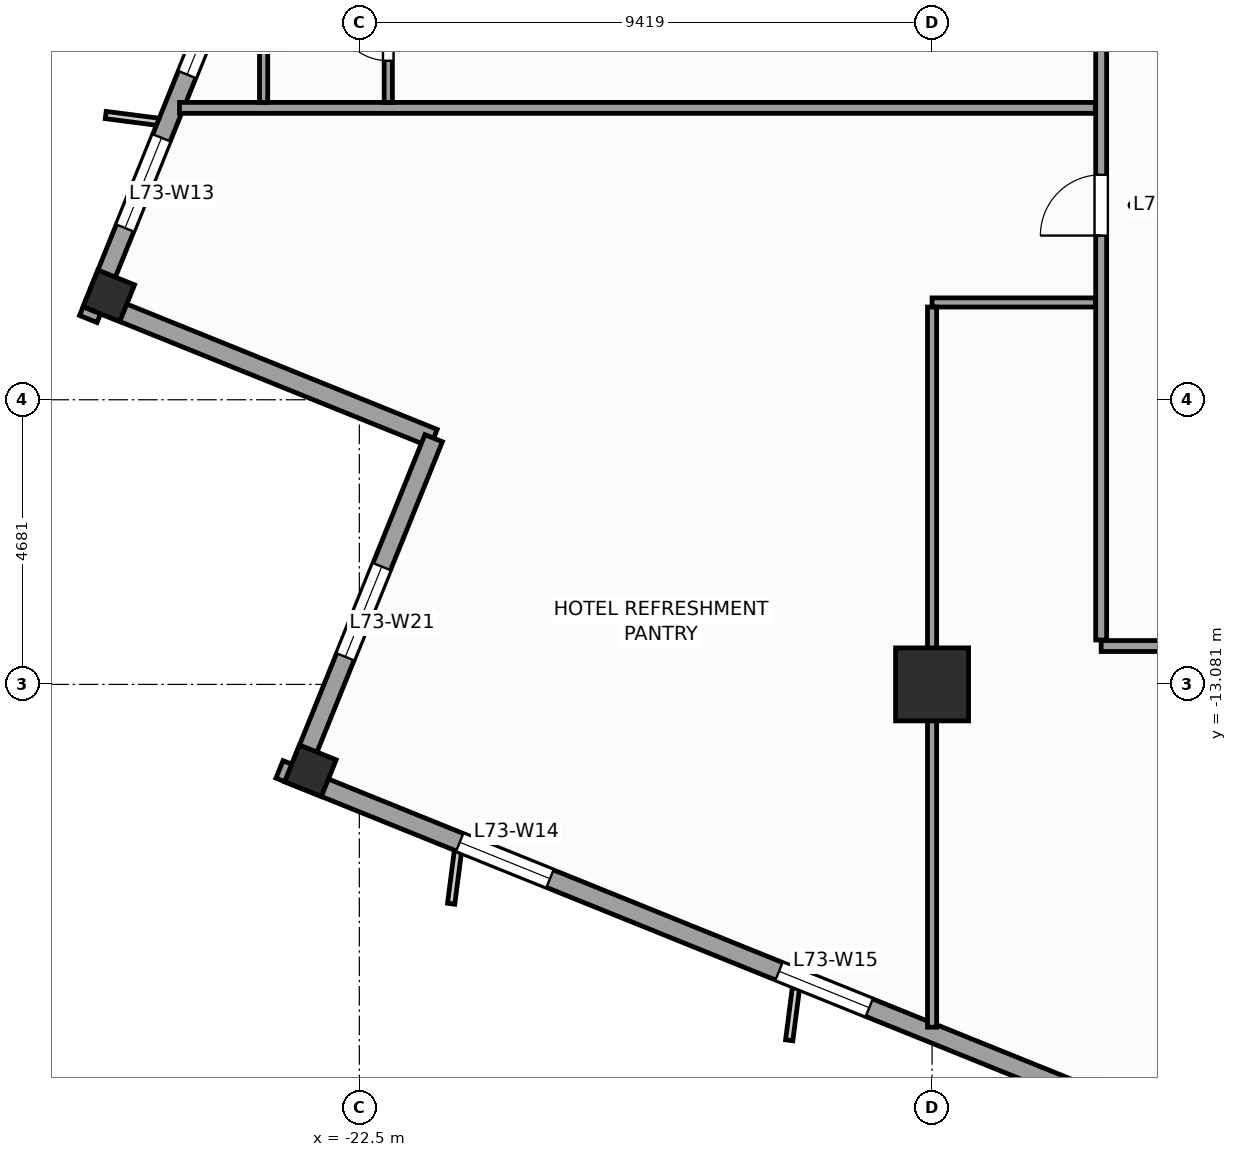
"""IFC4 building model, lengths in metres.
Left out: names, types, materials, properties, quantities, classifications, styles, units other than length and angle.
Written with IfcOpenShell. Run it as: python <this file> out.ifc"""

import sys

from ifc_helpers import new_model, si_unit, direction, frame, frame_2d, origin, origin_2d, place, context, subcontext, project, spatial, rectangle, extrude, source, transform, mapped, element, fill, save


model = new_model("IFC4")
c1 = context("Model", 3, precision=1e-05, world=origin(), true_north=direction((0.0, 1.0)))
c2 = subcontext(c1, "Body", "Model", "MODEL_VIEW")
j1 = project(units=[si_unit("LENGTHUNIT", "METRE"), si_unit("PLANEANGLEUNIT", "RADIAN")], contexts=[c1])
p1 = place(None, origin())
s1 = spatial("IfcSite", under=j1, at=p1, CompositionType="ELEMENT")
p2 = place(p1, origin())
s2 = spatial("IfcBuilding", under=s1, at=p2, CompositionType="ELEMENT")
p3 = place(p2, frame((0.0, 0.0, 297.6)))
s3 = spatial("IfcBuildingStorey", under=s2, at=p3, CompositionType="ELEMENT", Elevation=297.6)
m1 = source(origin(), c2, "Body", "SweptSolid", [
    extrude(rectangle(XDim=1.2, YDim=1.2, at=origin_2d()), origin(), (0.0, 0.0, 1.0), 3.6),
])
p4 = place(p3, frame((-13.081, -13.081, 0.0), z_axis=(0.0, 0.0, 1.0), x_axis=(1.0, 0.0, 0.0)))
e1 = element("IfcColumn", 1, at=p4, inside=s3, PredefinedType="COLUMN", context=c2, shape_type="MappedRepresentation", body=[
    mapped(m1, transform((0.0, 0.0, 0.0), scale=1.0)),
])
m2 = source(origin(), c2, "Body", "SweptSolid", [
    extrude(rectangle(XDim=0.65, YDim=0.65, at=origin_2d()), origin(), (0.0, 0.0, 1.0), 3.6),
])
for number, where, z_axis, x_axis in (
    (2, (-26.62, -6.69, 0.0), (0.0, 0.0, 1.0), (0.375, 0.927, 0.0)),
    (3, (-23.304, -14.501, 0.0), (0.0, 0.0, 1.0), (0.375, 0.927, 0.0)),
):
    element("IfcColumn", number, at=place(p3, frame(where, z_axis=z_axis, x_axis=x_axis)), inside=s3, PredefinedType="COLUMN", context=c2, shape_type="MappedRepresentation", body=[
        mapped(m2, transform((0.0, 0.0, 0.0), scale=1.0)),
    ])
p5 = place(p3, frame((-14.479, 23.813, 0.0), z_axis=(0.0, 0.0, 1.0), x_axis=(-0.374609557019, -0.927182657188, 0.0)))
e4 = element("IfcWall", 4, at=p5, inside=s3, PredefinedType="STANDARD", context=c2, shape_type="SweptSolid", body=[
    extrude(rectangle(XDim=33.31, YDim=0.31, at=frame_2d((16.655, 0.0))), origin(), (0.0, 0.0, 1.0), 2.75),
])
p6 = place(p5, frame((3.197, 0.0, 0.47)))
e5 = element("IfcOpeningElement", 5, at=p6, cuts=e4, PredefinedType="OPENING", context=c2, shape_type="SweptSolid", body=[
    extrude(rectangle(XDim=1.6, YDim=2.1, at=frame_2d((0.8, 1.05))), frame((0.0, 0.165, 0.0), z_axis=(0.0, -1.0, 0.0), x_axis=(1.0, 0.0, 0.0)), (0.0, 0.0, 1.0), 0.33),
])
p7 = place(p5, frame((8.86, 0.0, 0.47)))
e6 = element("IfcOpeningElement", 6, at=p7, cuts=e4, PredefinedType="OPENING", context=c2, shape_type="SweptSolid", body=[
    extrude(rectangle(XDim=1.6, YDim=2.1, at=frame_2d((0.8, 1.05))), frame((0.0, 0.165, 0.0), z_axis=(0.0, -1.0, 0.0), x_axis=(1.0, 0.0, 0.0)), (0.0, 0.0, 1.0), 0.33),
])
p8 = place(p5, frame((14.439, 0.0, 0.47)))
e7 = element("IfcOpeningElement", 7, at=p8, cuts=e4, PredefinedType="OPENING", context=c2, shape_type="SweptSolid", body=[
    extrude(rectangle(XDim=1.6, YDim=2.1, at=frame_2d((0.8, 1.05))), frame((0.0, 0.165, 0.0), z_axis=(0.0, -1.0, 0.0), x_axis=(1.0, 0.0, 0.0)), (0.0, 0.0, 1.0), 0.33),
])
p9 = place(p5, frame((23.351, 0.0, 0.47)))
e8 = element("IfcOpeningElement", 8, at=p9, cuts=e4, PredefinedType="OPENING", context=c2, shape_type="SweptSolid", body=[
    extrude(rectangle(XDim=1.6, YDim=2.1, at=frame_2d((0.8, 1.05))), frame((0.0, 0.165, 0.0), z_axis=(0.0, -1.0, 0.0), x_axis=(1.0, 0.0, 0.0)), (0.0, 0.0, 1.0), 0.33),
])
p10 = place(p5, frame((30.097, 0.0, 0.47)))
e9 = element("IfcOpeningElement", 9, at=p10, cuts=e4, PredefinedType="OPENING", context=c2, shape_type="SweptSolid", body=[
    extrude(rectangle(XDim=1.6, YDim=2.1, at=frame_2d((0.8, 1.05))), frame((0.0, 0.165, 0.0), z_axis=(0.0, -1.0, 0.0), x_axis=(1.0, 0.0, 0.0)), (0.0, 0.0, 1.0), 0.33),
])
p11 = place(p5, frame((27.374, 0.0, 0.47)))
e10 = element("IfcOpeningElement", 10, at=p11, cuts=e4, PredefinedType="OPENING", context=c2, shape_type="SweptSolid", body=[
    extrude(rectangle(XDim=1.6, YDim=2.1, at=frame_2d((0.8, 1.05))), frame((0.0, 0.165, 0.0), z_axis=(0.0, -1.0, 0.0), x_axis=(1.0, 0.0, 0.0)), (0.0, 0.0, 1.0), 0.33),
])
p12 = place(p3, frame((-26.841, -6.784, 0.0), z_axis=(0.0, 0.0, 1.0), x_axis=(0.927171722085, -0.374636620962, 0.0)))
e11 = element("IfcWall", 11, at=p12, inside=s3, PredefinedType="STANDARD", context=c2, shape_type="SweptSolid", body=[
    extrude(rectangle(XDim=6.0, YDim=0.31, at=frame_2d((3.0, 0.0))), origin(), (0.0, 0.0, 1.0), 2.65),
])
p13 = place(p3, frame((-21.278, -9.032, 0.0), z_axis=(0.0, 0.0, 1.0), x_axis=(-0.374602739196, -0.927185411764, 0.0)))
e12 = element("IfcWall", 12, at=p13, inside=s3, PredefinedType="STANDARD", context=c2, shape_type="SweptSolid", body=[
    extrude(rectangle(XDim=6.155, YDim=0.31, at=frame_2d((3.078, 0.0))), origin(), (0.0, 0.0, 1.0), 3.35),
])
p14 = place(p13, frame((2.278, 0.0, 0.47)))
e13 = element("IfcOpeningElement", 13, at=p14, cuts=e12, PredefinedType="OPENING", context=c2, shape_type="SweptSolid", body=[
    extrude(rectangle(XDim=1.6, YDim=2.1, at=frame_2d((0.8, 1.05))), frame((0.0, 0.165, 0.0), z_axis=(0.0, -1.0, 0.0), x_axis=(1.0, 0.0, 0.0)), (0.0, 0.0, 1.0), 0.33),
])
p15 = place(p3, frame((-23.813, -14.479, 0.0), z_axis=(0.0, 0.0, 1.0), x_axis=(0.927182657188, -0.374609557019, 0.0)))
e14 = element("IfcWall", 14, at=p15, inside=s3, PredefinedType="STANDARD", context=c2, shape_type="SweptSolid", body=[
    extrude(rectangle(XDim=33.31, YDim=0.31, at=frame_2d((16.655, 0.0))), origin(), (0.0, 0.0, 1.0), 2.75),
])
p16 = place(p15, frame((22.58, 0.0, 0.0)))
e15 = element("IfcOpeningElement", 15, at=p16, cuts=e14, PredefinedType="OPENING", context=c2, shape_type="SweptSolid", body=[
    extrude(rectangle(XDim=1.05, YDim=2.25, at=frame_2d((0.525, 1.125))), frame((0.0, 0.165, 0.0), z_axis=(0.0, -1.0, 0.0), x_axis=(1.0, 0.0, 0.0)), (0.0, 0.0, 1.0), 0.33),
])
p17 = place(p15, frame((3.197, 0.0, 0.47)))
e16 = element("IfcOpeningElement", 16, at=p17, cuts=e14, PredefinedType="OPENING", context=c2, shape_type="SweptSolid", body=[
    extrude(rectangle(XDim=1.6, YDim=2.1, at=frame_2d((0.8, 1.05))), frame((0.0, 0.165, 0.0), z_axis=(0.0, -1.0, 0.0), x_axis=(1.0, 0.0, 0.0)), (0.0, 0.0, 1.0), 0.33),
])
p18 = place(p15, frame((8.86, 0.0, 0.47)))
e17 = element("IfcOpeningElement", 17, at=p18, cuts=e14, PredefinedType="OPENING", context=c2, shape_type="SweptSolid", body=[
    extrude(rectangle(XDim=1.6, YDim=2.1, at=frame_2d((0.8, 1.05))), frame((0.0, 0.165, 0.0), z_axis=(0.0, -1.0, 0.0), x_axis=(1.0, 0.0, 0.0)), (0.0, 0.0, 1.0), 0.33),
])
p19 = place(p15, frame((14.439, 0.0, 0.47)))
e18 = element("IfcOpeningElement", 18, at=p19, cuts=e14, PredefinedType="OPENING", context=c2, shape_type="SweptSolid", body=[
    extrude(rectangle(XDim=1.6, YDim=2.1, at=frame_2d((0.8, 1.05))), frame((0.0, 0.165, 0.0), z_axis=(0.0, -1.0, 0.0), x_axis=(1.0, 0.0, 0.0)), (0.0, 0.0, 1.0), 0.33),
])
p20 = place(p15, frame((19.601, 0.0, 0.47)))
e19 = element("IfcOpeningElement", 19, at=p20, cuts=e14, PredefinedType="OPENING", context=c2, shape_type="SweptSolid", body=[
    extrude(rectangle(XDim=1.6, YDim=2.1, at=frame_2d((0.8, 1.05))), frame((0.0, 0.165, 0.0), z_axis=(0.0, -1.0, 0.0), x_axis=(1.0, 0.0, 0.0)), (0.0, 0.0, 1.0), 0.33),
])
p21 = place(p15, frame((27.097, 0.0, 0.47)))
e20 = element("IfcOpeningElement", 20, at=p21, cuts=e14, PredefinedType="OPENING", context=c2, shape_type="SweptSolid", body=[
    extrude(rectangle(XDim=1.6, YDim=2.1, at=frame_2d((0.8, 1.05))), frame((0.0, 0.165, 0.0), z_axis=(0.0, -1.0, 0.0), x_axis=(1.0, 0.0, 0.0)), (0.0, 0.0, 1.0), 0.33),
])
p22 = place(p3, frame((-10.3, -12.45, 0.0), z_axis=(0.0, 0.0, 1.0), x_axis=(1.0, 0.0, 0.0)))
e21 = element("IfcWall", 21, at=p22, inside=s3, PredefinedType="PARTITIONING", context=c2, shape_type="SweptSolid", body=[
    extrude(rectangle(XDim=21.65, YDim=0.18, at=frame_2d((10.825, 0.0))), origin(), (0.0, 0.0, 1.0), 3.35),
])
p23 = place(p22, frame((14.786, 0.0, 0.0)))
e22 = element("IfcOpeningElement", 22, at=p23, cuts=e21, PredefinedType="OPENING", context=c2, shape_type="SweptSolid", body=[
    extrude(rectangle(XDim=0.95, YDim=2.1, at=frame_2d((0.475, 1.05))), frame((0.0, 0.1, 0.0), z_axis=(0.0, -1.0, 0.0), x_axis=(1.0, 0.0, 0.0)), (0.0, 0.0, 1.0), 0.2),
])
p24 = place(p22, frame((9.8, 0.0, 0.0)))
e23 = element("IfcOpeningElement", 23, at=p24, cuts=e21, PredefinedType="OPENING", context=c2, shape_type="SweptSolid", body=[
    extrude(rectangle(XDim=1.0, YDim=2.15, at=frame_2d((0.5, 1.075))), frame((0.0, 0.1, 0.0), z_axis=(0.0, -1.0, 0.0), x_axis=(1.0, 0.0, 0.0)), (0.0, 0.0, 1.0), 0.2),
])
p25 = place(p22, frame((3.064, 0.0, 0.0)))
e24 = element("IfcOpeningElement", 24, at=p25, cuts=e21, PredefinedType="OPENING", context=c2, shape_type="SweptSolid", body=[
    extrude(rectangle(XDim=1.0, YDim=2.15, at=frame_2d((0.5, 1.075))), frame((0.0, 0.1, 0.0), z_axis=(0.0, -1.0, 0.0), x_axis=(1.0, 0.0, 0.0)), (0.0, 0.0, 1.0), 0.2),
])
p26 = place(p3, frame((-10.3, -12.35, 0.0), z_axis=(0.0, 0.0, 1.0), x_axis=(0.0, 1.0, 0.0)))
e25 = element("IfcWall", 25, at=p26, inside=s3, PredefinedType="PARTITIONING", context=c2, shape_type="SweptSolid", body=[
    extrude(rectangle(XDim=22.55, YDim=0.18, at=frame_2d((11.275, 0.0))), origin(), (0.0, 0.0, 1.0), 3.35),
])
p27 = place(p26, frame((13.95, 0.0, 0.0)))
e26 = element("IfcOpeningElement", 26, at=p27, cuts=e25, PredefinedType="OPENING", context=c2, shape_type="SweptSolid", body=[
    extrude(rectangle(XDim=1.0, YDim=2.15, at=frame_2d((0.5, 1.075))), frame((0.0, 0.1, 0.0), z_axis=(0.0, -1.0, 0.0), x_axis=(1.0, 0.0, 0.0)), (0.0, 0.0, 1.0), 0.2),
])
p28 = place(p26, frame((17.25, 0.0, 0.0)))
e27 = element("IfcOpeningElement", 27, at=p28, cuts=e25, PredefinedType="OPENING", context=c2, shape_type="SweptSolid", body=[
    extrude(rectangle(XDim=1.0, YDim=2.15, at=frame_2d((0.5, 1.075))), frame((0.0, 0.1, 0.0), z_axis=(0.0, -1.0, 0.0), x_axis=(1.0, 0.0, 0.0)), (0.0, 0.0, 1.0), 0.2),
])
p29 = place(p26, frame((6.65, 0.0, 0.0)))
e28 = element("IfcOpeningElement", 28, at=p29, cuts=e25, PredefinedType="OPENING", context=c2, shape_type="SweptSolid", body=[
    extrude(rectangle(XDim=1.0, YDim=2.15, at=frame_2d((0.5, 1.075))), frame((0.0, 0.1, 0.0), z_axis=(0.0, -1.0, 0.0), x_axis=(1.0, 0.0, 0.0)), (0.0, 0.0, 1.0), 0.2),
])
p30 = place(p26, frame((10.15, 0.0, 0.0)))
e29 = element("IfcOpeningElement", 29, at=p30, cuts=e25, PredefinedType="OPENING", context=c2, shape_type="SweptSolid", body=[
    extrude(rectangle(XDim=1.0, YDim=2.15, at=frame_2d((0.5, 1.075))), frame((0.0, 0.1, 0.0), z_axis=(0.0, -1.0, 0.0), x_axis=(1.0, 0.0, 0.0)), (0.0, 0.0, 1.0), 0.2),
])
p31 = place(p3, frame((-10.395, -3.6, 0.0), z_axis=(0.0, 0.0, 1.0), x_axis=(-1.0, 0.0, 0.0)))
e30 = element("IfcWall", 30, at=p31, inside=s3, PredefinedType="PARTITIONING", context=c2, shape_type="SweptSolid", body=[
    extrude(rectangle(XDim=15.062, YDim=0.18, at=frame_2d((7.531, 0.0))), origin(), (0.0, 0.0, 1.0), 3.02),
])
p32 = place(p3, frame((-10.395, -6.8, 0.0), z_axis=(0.0, 0.0, 1.0), x_axis=(-1.0, 0.0, 0.0)))
e31 = element("IfcWall", 31, at=p32, inside=s3, PredefinedType="PARTITIONING", context=c2, shape_type="SweptSolid", body=[
    extrude(rectangle(XDim=2.686, YDim=0.15, at=frame_2d((1.343, 0.0))), origin(), (0.0, 0.0, 1.0), 3.35),
])
p33 = place(p3, frame((-13.081, -6.875, 0.0), z_axis=(0.0, 0.0, 1.0), x_axis=(0.0, -1.0, 0.0)))
e32 = element("IfcWall", 32, at=p33, inside=s3, PredefinedType="PARTITIONING", context=c2, shape_type="SweptSolid", body=[
    extrude(rectangle(XDim=11.843, YDim=0.15, at=frame_2d((5.921, 0.0))), origin(), (0.0, 0.0, 1.0), 2.45),
])
p34 = place(p3, frame((-22.024, -3.51, 0.0), z_axis=(0.0, 0.0, 1.0), x_axis=(0.0, 1.0, 0.0)))
e33 = element("IfcWall", 33, at=p34, inside=s3, PredefinedType="PARTITIONING", context=c2, shape_type="SweptSolid", body=[
    extrude(rectangle(XDim=2.25, YDim=0.135, at=frame_2d((1.125, 0.0))), origin(), (0.0, 0.0, 1.0), 3.35),
])
p35 = place(p34, frame((0.685, 0.0, 0.0)))
e34 = element("IfcOpeningElement", 34, at=p35, cuts=e33, PredefinedType="OPENING", context=c2, shape_type="SweptSolid", body=[
    extrude(rectangle(XDim=0.88, YDim=2.1, at=frame_2d((0.44, 1.05))), frame((0.0, 0.078, 0.0), z_axis=(0.0, -1.0, 0.0), x_axis=(1.0, 0.0, 0.0)), (0.0, 0.0, 1.0), 0.155),
])
p36 = place(p3, frame((-24.074, -3.51, 0.0), z_axis=(0.0, 0.0, 1.0), x_axis=(0.0, 1.0, 0.0)))
e35 = element("IfcWall", 35, at=p36, inside=s3, PredefinedType="PARTITIONING", context=c2, shape_type="SweptSolid", body=[
    extrude(rectangle(XDim=2.25, YDim=0.135, at=frame_2d((1.125, 0.0))), origin(), (0.0, 0.0, 1.0), 3.35),
])
m3 = source(origin(), c2, "Body", "SweptSolid", [
    extrude(rectangle(XDim=1.6, YDim=2.1, at=frame_2d((0.8, 1.05))), frame((0.0, 0.03, 0.0), z_axis=(0.0, -1.0, 0.0), x_axis=(1.0, 0.0, 0.0)), (0.0, 0.0, 1.0), 0.06),
])
p37 = place(p10, origin())
e36 = element("IfcWindow", 36, at=p37, inside=s3, PartitioningType="SINGLE_PANEL", PredefinedType="WINDOW", context=c2, shape_type="MappedRepresentation", body=[
    mapped(m3, transform((0.0, 0.0, 0.0), scale=1.0)),
])
fill(e9, e36)
p38 = place(p17, origin())
e37 = element("IfcWindow", 37, at=p38, inside=s3, PartitioningType="SINGLE_PANEL", PredefinedType="WINDOW", context=c2, shape_type="MappedRepresentation", body=[
    mapped(m3, transform((0.0, 0.0, 0.0), scale=1.0)),
])
fill(e16, e37)
p39 = place(p18, origin())
e38 = element("IfcWindow", 38, at=p39, inside=s3, PartitioningType="SINGLE_PANEL", PredefinedType="WINDOW", context=c2, shape_type="MappedRepresentation", body=[
    mapped(m3, transform((0.0, 0.0, 0.0), scale=1.0)),
])
fill(e17, e38)
p40 = place(p14, origin())
e39 = element("IfcWindow", 39, at=p40, inside=s3, PartitioningType="SINGLE_PANEL", PredefinedType="WINDOW", context=c2, shape_type="MappedRepresentation", body=[
    mapped(m3, transform((0.0, 0.0, 0.0), scale=1.0)),
])
fill(e13, e39)
m4 = source(origin(), c2, "Body", "SweptSolid", [
    extrude(rectangle(XDim=1.0, YDim=2.15, at=frame_2d((0.5, 1.075))), frame((0.0, 0.025, 0.0), z_axis=(0.0, -1.0, 0.0), x_axis=(1.0, 0.0, 0.0)), (0.0, 0.0, 1.0), 0.05),
])
p41 = place(p29, origin())
e40 = element("IfcDoor", 40, at=p41, inside=s3, OperationType="SINGLE_SWING_LEFT", PredefinedType="DOOR", context=c2, shape_type="MappedRepresentation", body=[
    mapped(m4, transform((0.0, 0.0, 0.0), scale=1.0)),
])
fill(e28, e40)
m5 = source(origin(), c2, "Body", "SweptSolid", [
    extrude(rectangle(XDim=0.88, YDim=2.1, at=frame_2d((0.44, 1.05))), frame((0.0, 0.025, 0.0), z_axis=(0.0, -1.0, 0.0), x_axis=(1.0, 0.0, 0.0)), (0.0, 0.0, 1.0), 0.05),
])
p42 = place(p35, origin())
e41 = element("IfcDoor", 41, at=p42, inside=s3, OperationType="SINGLE_SWING_RIGHT", PredefinedType="DOOR", context=c2, shape_type="MappedRepresentation", body=[
    mapped(m5, transform((0.0, 0.0, 0.0), scale=1.0)),
])
fill(e34, e41)
p43 = place(p11, origin())
e42 = element("IfcWindow", 42, at=p43, inside=s3, PartitioningType="SINGLE_PANEL", PredefinedType="WINDOW", context=c2, shape_type="MappedRepresentation", body=[
    mapped(m3, transform((0.0, 0.0, 0.0), scale=1.0)),
])
fill(e10, e42)
save(model, sys.argv[1])
